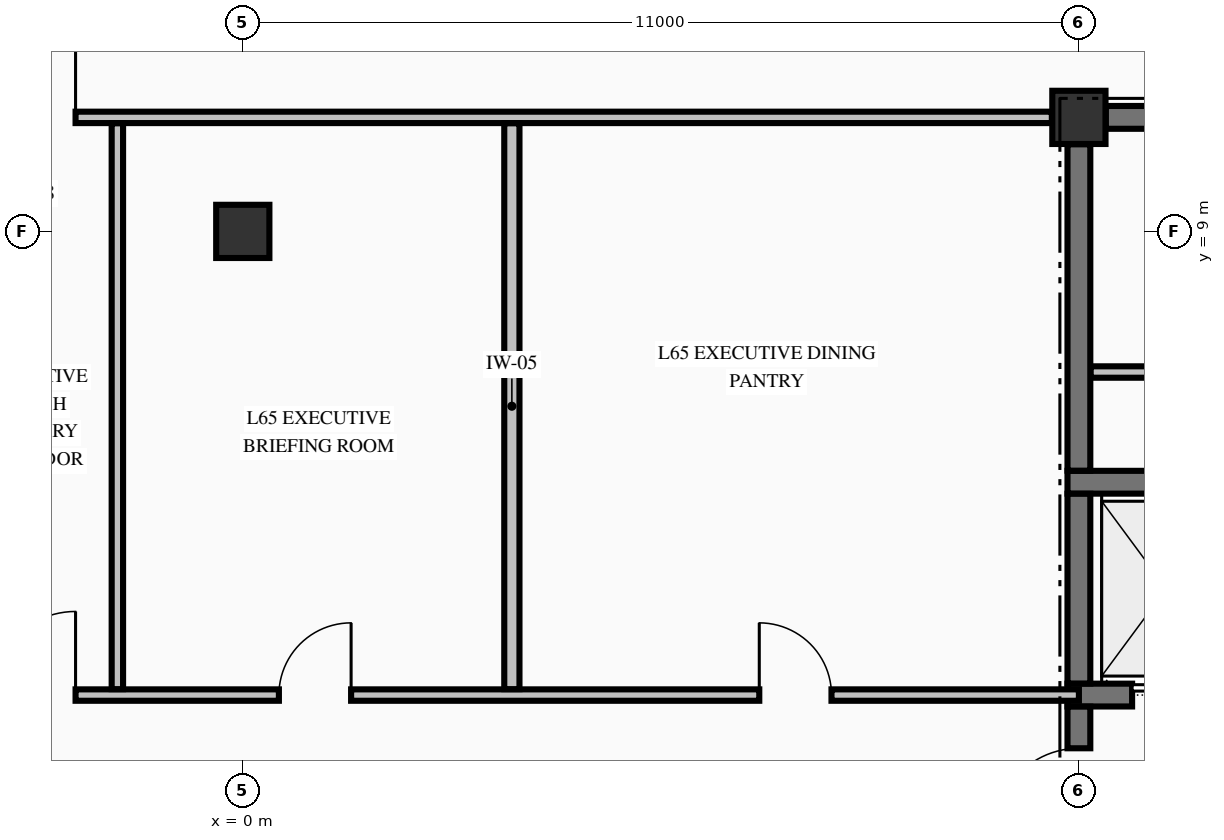
"""IFC4 building model, lengths in metres.
Left out: names, types, materials, properties, quantities, classifications, styles, units other than length and angle.
Written with IfcOpenShell. Run it as: python <this file> out.ifc"""

import sys

from ifc_helpers import new_model, si_unit, direction, frame, frame_2d, origin, origin_2d, place, context, subcontext, project, spatial, rectangle, extrude, element, fill, save


model = new_model("IFC4")
c1 = context("Model", 3, precision=1e-05, world=origin(), true_north=direction((0.0, 1.0)))
c2 = subcontext(c1, "Body", "Model", "MODEL_VIEW")
j1 = project(units=[si_unit("LENGTHUNIT", "METRE"), si_unit("PLANEANGLEUNIT", "RADIAN")], contexts=[c1])
p1 = place(None, origin())
s1 = spatial("IfcSite", under=j1, at=p1, CompositionType="ELEMENT")
p2 = place(p1, origin())
s2 = spatial("IfcBuilding", under=s1, at=p2, CompositionType="ELEMENT")
p3 = place(p2, frame((0.0, 0.0, 246.2)))
s3 = spatial("IfcBuildingStorey", under=s2, at=p3, CompositionType="ELEMENT", Elevation=246.2)
for number, where, z_axis, x_axis in (
    (1, (11.0, 10.5, -0.25), (0.0, 0.0, 1.0), (1.0, 0.0, 0.0)),
    (2, (0.0, 9.0, -0.25), (0.0, 0.0, 1.0), (1.0, 0.0, 0.0)),
):
    element("IfcColumn", number, at=place(p3, frame(where, z_axis=z_axis, x_axis=x_axis)), inside=s3, PredefinedType="COLUMN", context=c2, shape_type="SweptSolid", body=[
        extrude(rectangle(XDim=0.7, YDim=0.7, at=origin_2d()), origin(), (0.0, 0.0, 1.0), 3.055),
    ])
p4 = place(p3, frame((10.85, 2.9, 0.0), z_axis=(0.0, 0.0, 1.0), x_axis=(1.0, 0.0, 0.0)))
e3 = element("IfcWall", 3, at=p4, inside=s3, PredefinedType="SHEAR", context=c2, shape_type="SweptSolid", body=[
    extrude(rectangle(XDim=4.025, YDim=0.3, at=frame_2d((2.012, 0.0))), origin(), (0.0, 0.0, 1.0), 2.805),
])
p5 = place(p4, frame((0.85, 0.0, 0.0)))
e4 = element("IfcOpeningElement", 4, at=p5, cuts=e3, PredefinedType="OPENING", context=c2, shape_type="SweptSolid", body=[
    extrude(rectangle(XDim=1.1, YDim=2.2, at=frame_2d((0.55, 1.1))), frame((0.0, 0.16, 0.0), z_axis=(0.0, -1.0, 0.0), x_axis=(1.0, 0.0, 0.0)), (0.0, 0.0, 1.0), 0.32),
])
p6 = place(p3, frame((10.85, 5.7, 0.0), z_axis=(0.0, 0.0, 1.0), x_axis=(1.0, 0.0, 0.0)))
e5 = element("IfcWall", 5, at=p6, inside=s3, PredefinedType="SHEAR", context=c2, shape_type="SweptSolid", body=[
    extrude(rectangle(XDim=4.025, YDim=0.3, at=frame_2d((2.012, 0.0))), origin(), (0.0, 0.0, 1.0), 2.805),
])
p7 = place(p3, frame((11.354, 10.5, 0.0), z_axis=(0.0, 0.0, 1.0), x_axis=(1.0, 0.0, 0.0)))
e6 = element("IfcWall", 6, at=p7, inside=s3, PredefinedType="SHEAR", context=c2, shape_type="SweptSolid", body=[
    extrude(rectangle(XDim=3.346, YDim=0.3, at=frame_2d((1.673, 0.0))), origin(), (0.0, 0.0, 1.0), 2.805),
])
p8 = place(p7, frame((2.091, 0.0, 0.0)))
e7 = element("IfcOpeningElement", 7, at=p8, cuts=e6, PredefinedType="OPENING", context=c2, shape_type="SweptSolid", body=[
    extrude(rectangle(XDim=0.95, YDim=2.15, at=frame_2d((0.475, 1.075))), frame((0.0, 0.16, 0.0), z_axis=(0.0, -1.0, 0.0), x_axis=(1.0, 0.0, 0.0)), (0.0, 0.0, 1.0), 0.32),
])
p9 = place(p3, frame((-11.0, 2.9, 0.0), z_axis=(0.0, 0.0, 1.0), x_axis=(1.0, 0.0, 0.0)))
e8 = element("IfcWall", 8, at=p9, inside=s3, PredefinedType="PARTITIONING", context=c2, shape_type="SweptSolid", body=[
    extrude(rectangle(XDim=22.0, YDim=0.15, at=frame_2d((11.0, 0.0))), origin(), (0.0, 0.0, 1.0), 2.805),
])
p10 = place(p9, frame((7.7, 0.0, 0.0)))
e9 = element("IfcOpeningElement", 9, at=p10, cuts=e8, PredefinedType="OPENING", context=c2, shape_type="SweptSolid", body=[
    extrude(rectangle(XDim=1.1, YDim=2.15, at=frame_2d((0.55, 1.075))), frame((0.0, 0.085, 0.0), z_axis=(0.0, -1.0, 0.0), x_axis=(1.0, 0.0, 0.0)), (0.0, 0.0, 1.0), 0.17),
])
p11 = place(p9, frame((3.055, 0.0, 0.0)))
e10 = element("IfcOpeningElement", 10, at=p11, cuts=e8, PredefinedType="OPENING", context=c2, shape_type="SweptSolid", body=[
    extrude(rectangle(XDim=1.05, YDim=2.15, at=frame_2d((0.525, 1.075))), frame((0.0, 0.085, 0.0), z_axis=(0.0, -1.0, 0.0), x_axis=(1.0, 0.0, 0.0)), (0.0, 0.0, 1.0), 0.17),
])
p12 = place(p9, frame((11.475, 0.0, 0.0)))
e11 = element("IfcOpeningElement", 11, at=p12, cuts=e8, PredefinedType="OPENING", context=c2, shape_type="SweptSolid", body=[
    extrude(rectangle(XDim=0.95, YDim=2.15, at=frame_2d((0.475, 1.075))), frame((0.0, 0.085, 0.0), z_axis=(0.0, -1.0, 0.0), x_axis=(1.0, 0.0, 0.0)), (0.0, 0.0, 1.0), 0.17),
])
p13 = place(p9, frame((17.795, 0.0, 0.0)))
e12 = element("IfcOpeningElement", 12, at=p13, cuts=e8, PredefinedType="OPENING", context=c2, shape_type="SweptSolid", body=[
    extrude(rectangle(XDim=0.95, YDim=2.15, at=frame_2d((0.475, 1.075))), frame((0.0, 0.085, 0.0), z_axis=(0.0, -1.0, 0.0), x_axis=(1.0, 0.0, 0.0)), (0.0, 0.0, 1.0), 0.17),
])
p14 = place(p3, frame((11.153, 7.15, 0.0), z_axis=(0.0, 0.0, 1.0), x_axis=(1.0, 0.0, 0.0)))
e13 = element("IfcWall", 13, at=p14, inside=s3, PredefinedType="PARTITIONING", context=c2, shape_type="SweptSolid", body=[
    extrude(rectangle(XDim=2.072, YDim=0.15, at=frame_2d((1.036, 0.0))), origin(), (0.0, 0.0, 1.0), 2.805),
])
p15 = place(p3, frame((-10.644, 10.5, 0.0), z_axis=(0.0, 0.0, 1.0), x_axis=(1.0, 0.0, 0.0)))
e14 = element("IfcWall", 14, at=p15, inside=s3, PredefinedType="PARTITIONING", context=c2, shape_type="SweptSolid", body=[
    extrude(rectangle(XDim=21.288, YDim=0.15, at=frame_2d((10.644, 0.0))), origin(), (0.0, 0.0, 1.0), 2.805),
])
p16 = place(p15, frame((7.344, 0.0, 0.0)))
e15 = element("IfcOpeningElement", 15, at=p16, cuts=e14, PredefinedType="OPENING", context=c2, shape_type="SweptSolid", body=[
    extrude(rectangle(XDim=1.1, YDim=2.15, at=frame_2d((0.55, 1.075))), frame((0.0, 0.085, 0.0), z_axis=(0.0, -1.0, 0.0), x_axis=(1.0, 0.0, 0.0)), (0.0, 0.0, 1.0), 0.17),
])
p17 = place(p3, frame((11.0, 0.354, 0.0), z_axis=(0.0, 0.0, 1.0), x_axis=(0.0, 1.0, 0.0)))
e16 = element("IfcWall", 16, at=p17, inside=s3, PredefinedType="SHEAR", context=c2, shape_type="SweptSolid", body=[
    extrude(rectangle(XDim=2.394, YDim=0.3, at=frame_2d((1.197, 0.0))), origin(), (0.0, 0.0, 1.0), 2.805),
])
p18 = place(p17, frame((0.746, 0.0, 0.0)))
e17 = element("IfcOpeningElement", 17, at=p18, cuts=e16, PredefinedType="OPENING", context=c2, shape_type="SweptSolid", body=[
    extrude(rectangle(XDim=1.1, YDim=2.15, at=frame_2d((0.55, 1.075))), frame((0.0, 0.16, 0.0), z_axis=(0.0, -1.0, 0.0), x_axis=(1.0, 0.0, 0.0)), (0.0, 0.0, 1.0), 0.32),
])
p19 = place(p3, frame((11.0, 3.052, 0.0), z_axis=(0.0, 0.0, 1.0), x_axis=(0.0, 1.0, 0.0)))
e18 = element("IfcWall", 18, at=p19, inside=s3, PredefinedType="SHEAR", context=c2, shape_type="SweptSolid", body=[
    extrude(rectangle(XDim=2.496, YDim=0.3, at=frame_2d((1.248, 0.0))), origin(), (0.0, 0.0, 1.0), 2.805),
])
p20 = place(p3, frame((11.0, 5.852, 0.0), z_axis=(0.0, 0.0, 1.0), x_axis=(0.0, 1.0, 0.0)))
e19 = element("IfcWall", 19, at=p20, inside=s3, PredefinedType="SHEAR", context=c2, shape_type="SweptSolid", body=[
    extrude(rectangle(XDim=4.294, YDim=0.3, at=frame_2d((2.147, 0.0))), origin(), (0.0, 0.0, 1.0), 2.805),
])
p21 = place(p3, frame((-1.65, 2.978, 0.0), z_axis=(0.0, 0.0, 1.0), x_axis=(0.0, 1.0, 0.0)))
e20 = element("IfcWall", 20, at=p21, inside=s3, PredefinedType="PARTITIONING", context=c2, shape_type="SweptSolid", body=[
    extrude(rectangle(XDim=7.444, YDim=0.15, at=frame_2d((3.722, 0.0))), origin(), (0.0, 0.0, 1.0), 2.805),
])
p22 = place(p3, frame((3.54, 2.978, 0.0), z_axis=(0.0, 0.0, 1.0), x_axis=(0.0, 1.0, 0.0)))
e21 = element("IfcWall", 21, at=p22, inside=s3, PredefinedType="PARTITIONING", context=c2, shape_type="SweptSolid", body=[
    extrude(rectangle(XDim=7.444, YDim=0.2, at=frame_2d((3.722, 0.0))), origin(), (0.0, 0.0, 1.0), 2.805),
])
p23 = place(p18, origin())
e22 = element("IfcDoor", 22, at=p23, inside=s3, OperationType="SINGLE_SWING_LEFT", PredefinedType="DOOR", context=c2, shape_type="SweptSolid", body=[
    extrude(rectangle(XDim=1.1, YDim=2.15, at=frame_2d((0.55, 1.075))), frame((0.0, 0.025, 0.0), z_axis=(0.0, -1.0, 0.0), x_axis=(1.0, 0.0, 0.0)), (0.0, 0.0, 1.0), 0.05),
])
fill(e17, e22)
p24 = place(p5, origin())
e23 = element("IfcDoor", 23, at=p24, inside=s3, OperationType="SLIDING_TO_RIGHT", PredefinedType="DOOR", context=c2, shape_type="SweptSolid", body=[
    extrude(rectangle(XDim=1.1, YDim=2.2, at=frame_2d((0.55, 1.1))), frame((0.0, 0.025, 0.0), z_axis=(0.0, -1.0, 0.0), x_axis=(1.0, 0.0, 0.0)), (0.0, 0.0, 1.0), 0.05),
])
fill(e4, e23)
p25 = place(p16, origin())
e24 = element("IfcDoor", 24, at=p25, inside=s3, OperationType="SINGLE_SWING_RIGHT", PredefinedType="DOOR", context=c2, shape_type="SweptSolid", body=[
    extrude(rectangle(XDim=1.1, YDim=2.15, at=frame_2d((0.55, 1.075))), frame((0.0, 0.025, 0.0), z_axis=(0.0, -1.0, 0.0), x_axis=(1.0, 0.0, 0.0)), (0.0, 0.0, 1.0), 0.05),
])
fill(e15, e24)
p26 = place(p10, origin())
e25 = element("IfcDoor", 25, at=p26, inside=s3, OperationType="SINGLE_SWING_RIGHT", PredefinedType="DOOR", context=c2, shape_type="SweptSolid", body=[
    extrude(rectangle(XDim=1.1, YDim=2.15, at=frame_2d((0.55, 1.075))), frame((0.0, 0.025, 0.0), z_axis=(0.0, -1.0, 0.0), x_axis=(1.0, 0.0, 0.0)), (0.0, 0.0, 1.0), 0.05),
])
fill(e9, e25)
p27 = place(p12, origin())
e26 = element("IfcDoor", 26, at=p27, inside=s3, OperationType="SINGLE_SWING_RIGHT", PredefinedType="DOOR", context=c2, shape_type="SweptSolid", body=[
    extrude(rectangle(XDim=0.95, YDim=2.15, at=frame_2d((0.475, 1.075))), frame((0.0, 0.025, 0.0), z_axis=(0.0, -1.0, 0.0), x_axis=(1.0, 0.0, 0.0)), (0.0, 0.0, 1.0), 0.05),
])
fill(e11, e26)
p28 = place(p13, origin())
e27 = element("IfcDoor", 27, at=p28, inside=s3, OperationType="SINGLE_SWING_LEFT", PredefinedType="DOOR", context=c2, shape_type="SweptSolid", body=[
    extrude(rectangle(XDim=0.95, YDim=2.15, at=frame_2d((0.475, 1.075))), frame((0.0, 0.025, 0.0), z_axis=(0.0, -1.0, 0.0), x_axis=(1.0, 0.0, 0.0)), (0.0, 0.0, 1.0), 0.05),
])
fill(e12, e27)
save(model, sys.argv[1])
